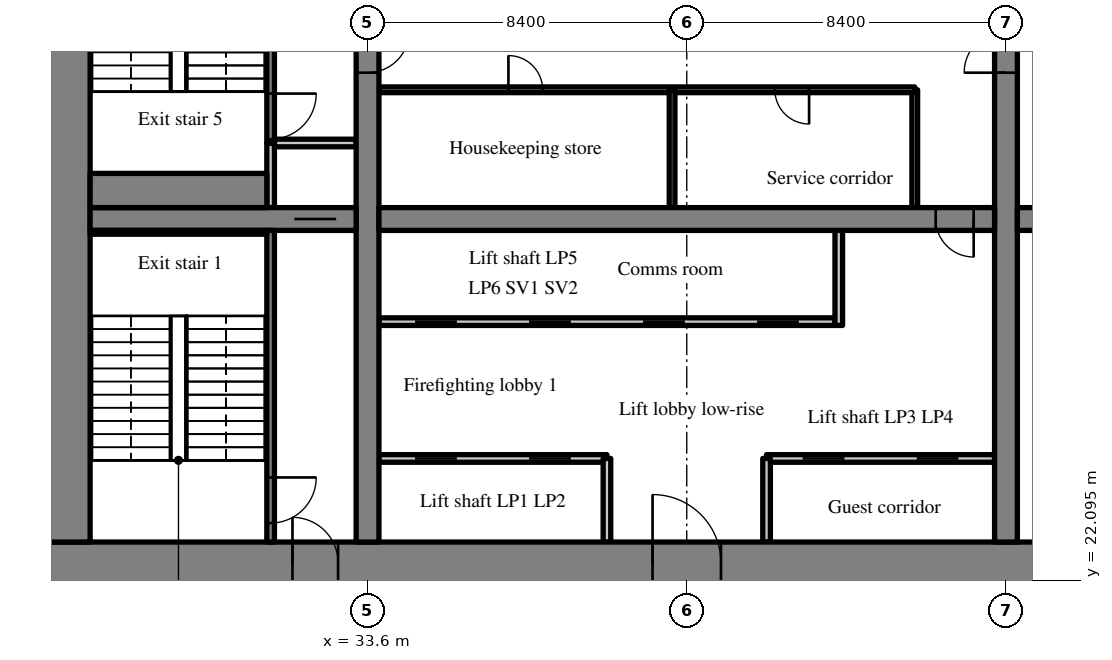
"""IFC4 building model, lengths in metres.
Left out: names, types, materials, properties, quantities, classifications, styles, units other than length and angle.
Written with IfcOpenShell. Run it as: python <this file> out.ifc"""

import sys

from ifc_helpers import new_model, si_unit, direction, frame, frame_2d, origin, place, context, subcontext, project, spatial, rectangle, extrude, source, transform, mapped, element, fill, save


model = new_model("IFC4")
c1 = context("Model", 3, precision=1e-05, world=origin(), true_north=direction((0.0, 1.0)))
c2 = subcontext(c1, "Body", "Model", "MODEL_VIEW")
j1 = project(units=[si_unit("LENGTHUNIT", "METRE"), si_unit("PLANEANGLEUNIT", "RADIAN")], contexts=[c1])
p1 = place(None, origin())
s1 = spatial("IfcSite", under=j1, at=p1, CompositionType="ELEMENT")
p2 = place(p1, origin())
s2 = spatial("IfcBuilding", under=s1, at=p2, CompositionType="ELEMENT")
p3 = place(p2, frame((0.0, 0.0, 27.8)))
s3 = spatial("IfcBuildingStorey", under=s2, at=p3, CompositionType="ELEMENT", Elevation=27.8)
m1 = source(origin(), c2, "Body", "SweptSolid", [
    extrude(rectangle(XDim=50.4, YDim=1.1, at=frame_2d((25.2, 0.0))), origin(), (0.0, 0.0, 1.0), 3.52),
])
p4 = place(p3, frame((25.2, 22.55, 0.0), z_axis=(0.0, 0.0, 1.0), x_axis=(1.0, 0.0, 0.0)))
e1 = element("IfcWall", 1, at=p4, inside=s3, PredefinedType="SHEAR", context=c2, shape_type="MappedRepresentation", body=[
    mapped(m1, transform((0.0, 0.0, 0.0), scale=1.0)),
])
m2 = source(origin(), c2, "Body", "SweptSolid", [
    extrude(rectangle(XDim=1.8, YDim=2.1, at=frame_2d((0.9, 1.05))), frame((0.0, 0.56, 0.0), z_axis=(0.0, -1.0, 0.0), x_axis=(1.0, 0.0, 0.0)), (0.0, 0.0, 1.0), 1.12),
])
p5 = place(p4, frame((15.9, 0.0, 0.0)))
e2 = element("IfcOpeningElement", 2, at=p5, cuts=e1, PredefinedType="OPENING", context=c2, shape_type="MappedRepresentation", body=[
    mapped(m2, transform((0.0, 0.0, 0.0), scale=1.0)),
])
m3 = source(origin(), c2, "Body", "SweptSolid", [
    extrude(rectangle(XDim=1.2, YDim=2.1, at=frame_2d((0.6, 1.05))), frame((0.0, 0.56, 0.0), z_axis=(0.0, -1.0, 0.0), x_axis=(1.0, 0.0, 0.0)), (0.0, 0.0, 1.0), 1.12),
])
p6 = place(p4, frame((27.0, 0.0, 0.0)))
e3 = element("IfcOpeningElement", 3, at=p6, cuts=e1, PredefinedType="OPENING", context=c2, shape_type="MappedRepresentation", body=[
    mapped(m3, transform((0.0, 0.0, 0.0), scale=1.0)),
])
m4 = source(origin(), c2, "Body", "SweptSolid", [
    extrude(rectangle(XDim=0.9, YDim=2.1, at=frame_2d((0.45, 1.05))), frame((0.0, 0.56, 0.0), z_axis=(0.0, -1.0, 0.0), x_axis=(1.0, 0.0, 0.0)), (0.0, 0.0, 1.0), 1.12),
])
p7 = place(p4, frame((32.25, 0.0, 0.0)))
e4 = element("IfcOpeningElement", 4, at=p7, cuts=e1, PredefinedType="OPENING", context=c2, shape_type="MappedRepresentation", body=[
    mapped(m4, transform((0.0, 0.0, 0.0), scale=1.0)),
])
p8 = place(p4, frame((38.25, 0.0, 0.0)))
e5 = element("IfcOpeningElement", 5, at=p8, cuts=e1, PredefinedType="OPENING", context=c2, shape_type="MappedRepresentation", body=[
    mapped(m4, transform((0.0, 0.0, 0.0), scale=1.0)),
])
p9 = place(p4, frame((6.425, 0.0, 0.0)))
e6 = element("IfcOpeningElement", 6, at=p9, cuts=e1, PredefinedType="OPENING", context=c2, shape_type="MappedRepresentation", body=[
    mapped(m3, transform((0.0, 0.0, 0.0), scale=1.0)),
])
p10 = place(p4, frame((47.675, 0.0, 0.0)))
e7 = element("IfcOpeningElement", 7, at=p10, cuts=e1, PredefinedType="OPENING", context=c2, shape_type="MappedRepresentation", body=[
    mapped(m3, transform((0.0, 0.0, 0.0), scale=1.0)),
])
m5 = source(origin(), c2, "Body", "SweptSolid", [
    extrude(rectangle(XDim=17.8, YDim=1.1, at=frame_2d((8.9, 0.0))), origin(), (0.0, 0.0, 1.0), 3.52),
])
p11 = place(p3, frame((25.75, 23.1, 0.0), z_axis=(0.0, 0.0, 1.0), x_axis=(0.0, 1.0, 0.0)))
e8 = element("IfcWall", 8, at=p11, inside=s3, PredefinedType="SHEAR", context=c2, shape_type="MappedRepresentation", body=[
    mapped(m5, transform((0.0, 0.0, 0.0), scale=1.0)),
])
m6 = source(origin(), c2, "Body", "SweptSolid", [
    extrude(rectangle(XDim=17.8, YDim=0.6, at=frame_2d((8.9, 0.0))), origin(), (0.0, 0.0, 1.0), 3.52),
])
p12 = place(p3, frame((33.6, 23.1, 0.0), z_axis=(0.0, 0.0, 1.0), x_axis=(0.0, 1.0, 0.0)))
e9 = element("IfcWall", 9, at=p12, inside=s3, PredefinedType="SHEAR", context=c2, shape_type="MappedRepresentation", body=[
    mapped(m6, transform((0.0, 0.0, 0.0), scale=1.0)),
])
m7 = source(origin(), c2, "Body", "SweptSolid", [
    extrude(rectangle(XDim=1.1, YDim=2.1, at=frame_2d((0.55, 1.05))), frame((0.0, 0.31, 0.0), z_axis=(0.0, -1.0, 0.0), x_axis=(1.0, 0.0, 0.0)), (0.0, 0.0, 1.0), 0.62),
])
p13 = place(p12, frame((12.35, 0.0, 0.0)))
e10 = element("IfcOpeningElement", 10, at=p13, cuts=e9, PredefinedType="OPENING", context=c2, shape_type="MappedRepresentation", body=[
    mapped(m7, transform((0.0, 0.0, 0.0), scale=1.0)),
])
p14 = place(p3, frame((50.4, 23.1, 0.0), z_axis=(0.0, 0.0, 1.0), x_axis=(0.0, 1.0, 0.0)))
e11 = element("IfcWall", 11, at=p14, inside=s3, PredefinedType="SHEAR", context=c2, shape_type="MappedRepresentation", body=[
    mapped(m6, transform((0.0, 0.0, 0.0), scale=1.0)),
])
p15 = place(p14, frame((12.35, 0.0, 0.0)))
e12 = element("IfcOpeningElement", 12, at=p15, cuts=e11, PredefinedType="OPENING", context=c2, shape_type="MappedRepresentation", body=[
    mapped(m7, transform((0.0, 0.0, 0.0), scale=1.0)),
])
m8 = source(origin(), c2, "Body", "SweptSolid", [
    extrude(rectangle(XDim=7.0, YDim=0.6, at=frame_2d((3.5, 0.0))), origin(), (0.0, 0.0, 1.0), 3.52),
])
p16 = place(p3, frame((26.3, 31.6, 0.0), z_axis=(0.0, 0.0, 1.0), x_axis=(1.0, 0.0, 0.0)))
e13 = element("IfcWall", 13, at=p16, inside=s3, PredefinedType="SHEAR", context=c2, shape_type="MappedRepresentation", body=[
    mapped(m8, transform((0.0, 0.0, 0.0), scale=1.0)),
])
p17 = place(p16, frame((5.375, 0.0, 0.0)))
e14 = element("IfcOpeningElement", 14, at=p17, cuts=e13, PredefinedType="OPENING", context=c2, shape_type="MappedRepresentation", body=[
    mapped(m7, transform((0.0, 0.0, 0.0), scale=1.0)),
])
m9 = source(origin(), c2, "Body", "SweptSolid", [
    extrude(rectangle(XDim=16.2, YDim=0.6, at=frame_2d((8.1, 0.0))), origin(), (0.0, 0.0, 1.0), 3.52),
])
p18 = place(p3, frame((33.9, 31.6, 0.0), z_axis=(0.0, 0.0, 1.0), x_axis=(1.0, 0.0, 0.0)))
e15 = element("IfcWall", 15, at=p18, inside=s3, PredefinedType="SHEAR", context=c2, shape_type="MappedRepresentation", body=[
    mapped(m9, transform((0.0, 0.0, 0.0), scale=1.0)),
])
m10 = source(origin(), c2, "Body", "SweptSolid", [
    extrude(rectangle(XDim=1.0, YDim=2.1, at=frame_2d((0.5, 1.05))), frame((0.0, 0.31, 0.0), z_axis=(0.0, -1.0, 0.0), x_axis=(1.0, 0.0, 0.0)), (0.0, 0.0, 1.0), 0.62),
])
p19 = place(p18, frame((14.65, 0.0, 0.0)))
e16 = element("IfcOpeningElement", 16, at=p19, cuts=e15, PredefinedType="OPENING", context=c2, shape_type="MappedRepresentation", body=[
    mapped(m10, transform((0.0, 0.0, 0.0), scale=1.0)),
])
m11 = source(origin(), c2, "Body", "SweptSolid", [
    extrude(rectangle(XDim=16.2, YDim=0.6, at=frame_2d((8.1, 0.0))), origin(), (0.0, 0.0, 1.0), 3.52),
])
p20 = place(p3, frame((50.7, 31.6, 0.0), z_axis=(0.0, 0.0, 1.0), x_axis=(1.0, 0.0, 0.0)))
e17 = element("IfcWall", 17, at=p20, inside=s3, PredefinedType="SHEAR", context=c2, shape_type="MappedRepresentation", body=[
    mapped(m11, transform((0.0, 0.0, 0.0), scale=1.0)),
])
p21 = place(p20, frame((0.55, 0.0, 0.0)))
e18 = element("IfcOpeningElement", 18, at=p21, cuts=e17, PredefinedType="OPENING", context=c2, shape_type="MappedRepresentation", body=[
    mapped(m10, transform((0.0, 0.0, 0.0), scale=1.0)),
])
m12 = source(origin(), c2, "Body", "SweptSolid", [
    extrude(rectangle(XDim=6.0, YDim=0.2, at=frame_2d((3.0, 0.0))), origin(), (0.0, 0.0, 1.0), 3.52),
])
p22 = place(p3, frame((33.9, 25.3, 0.0), z_axis=(0.0, 0.0, 1.0), x_axis=(1.0, 0.0, 0.0)))
e19 = element("IfcWall", 19, at=p22, inside=s3, PredefinedType="SOLIDWALL", context=c2, shape_type="MappedRepresentation", body=[
    mapped(m12, transform((0.0, 0.0, 0.0), scale=1.0)),
])
m13 = source(origin(), c2, "Body", "SweptSolid", [
    extrude(rectangle(XDim=1.1, YDim=2.1, at=frame_2d((0.55, 1.05))), frame((0.0, 0.11, 0.0), z_axis=(0.0, -1.0, 0.0), x_axis=(1.0, 0.0, 0.0)), (0.0, 0.0, 1.0), 0.22),
])
p23 = place(p22, frame((0.95, 0.0, 0.0)))
e20 = element("IfcOpeningElement", 20, at=p23, cuts=e19, PredefinedType="OPENING", context=c2, shape_type="MappedRepresentation", body=[
    mapped(m13, transform((0.0, 0.0, 0.0), scale=1.0)),
])
p24 = place(p22, frame((3.95, 0.0, 0.0)))
e21 = element("IfcOpeningElement", 21, at=p24, cuts=e19, PredefinedType="OPENING", context=c2, shape_type="MappedRepresentation", body=[
    mapped(m13, transform((0.0, 0.0, 0.0), scale=1.0)),
])
p25 = place(p3, frame((44.1, 25.3, 0.0), z_axis=(0.0, 0.0, 1.0), x_axis=(1.0, 0.0, 0.0)))
e22 = element("IfcWall", 22, at=p25, inside=s3, PredefinedType="SOLIDWALL", context=c2, shape_type="MappedRepresentation", body=[
    mapped(m12, transform((0.0, 0.0, 0.0), scale=1.0)),
])
p26 = place(p25, frame((0.95, 0.0, 0.0)))
e23 = element("IfcOpeningElement", 23, at=p26, cuts=e22, PredefinedType="OPENING", context=c2, shape_type="MappedRepresentation", body=[
    mapped(m13, transform((0.0, 0.0, 0.0), scale=1.0)),
])
p27 = place(p25, frame((3.95, 0.0, 0.0)))
e24 = element("IfcOpeningElement", 24, at=p27, cuts=e22, PredefinedType="OPENING", context=c2, shape_type="MappedRepresentation", body=[
    mapped(m13, transform((0.0, 0.0, 0.0), scale=1.0)),
])
m14 = source(origin(), c2, "Body", "SweptSolid", [
    extrude(rectangle(XDim=12.0, YDim=0.2, at=frame_2d((6.0, 0.0))), origin(), (0.0, 0.0, 1.0), 3.52),
])
p28 = place(p3, frame((33.9, 28.9, 0.0), z_axis=(0.0, 0.0, 1.0), x_axis=(1.0, 0.0, 0.0)))
e25 = element("IfcWall", 25, at=p28, inside=s3, PredefinedType="SOLIDWALL", context=c2, shape_type="MappedRepresentation", body=[
    mapped(m14, transform((0.0, 0.0, 0.0), scale=1.0)),
])
p29 = place(p28, frame((0.95, 0.0, 0.0)))
e26 = element("IfcOpeningElement", 26, at=p29, cuts=e25, PredefinedType="OPENING", context=c2, shape_type="MappedRepresentation", body=[
    mapped(m13, transform((0.0, 0.0, 0.0), scale=1.0)),
])
p30 = place(p28, frame((3.95, 0.0, 0.0)))
e27 = element("IfcOpeningElement", 27, at=p30, cuts=e25, PredefinedType="OPENING", context=c2, shape_type="MappedRepresentation", body=[
    mapped(m13, transform((0.0, 0.0, 0.0), scale=1.0)),
])
p31 = place(p28, frame((6.95, 0.0, 0.0)))
e28 = element("IfcOpeningElement", 28, at=p31, cuts=e25, PredefinedType="OPENING", context=c2, shape_type="MappedRepresentation", body=[
    mapped(m13, transform((0.0, 0.0, 0.0), scale=1.0)),
])
p32 = place(p28, frame((9.95, 0.0, 0.0)))
e29 = element("IfcOpeningElement", 29, at=p32, cuts=e25, PredefinedType="OPENING", context=c2, shape_type="MappedRepresentation", body=[
    mapped(m13, transform((0.0, 0.0, 0.0), scale=1.0)),
])
m15 = source(origin(), c2, "Body", "SweptSolid", [
    extrude(rectangle(XDim=2.2, YDim=0.2, at=frame_2d((1.1, 0.0))), origin(), (0.0, 0.0, 1.0), 3.52),
])
for number, where, z_axis, x_axis in (
    (30, (39.9, 23.1, 0.0), (0.0, 0.0, 1.0), (0.0, 1.0, 0.0)),
    (31, (44.1, 23.1, 0.0), (0.0, 0.0, 1.0), (0.0, 1.0, 0.0)),
):
    element("IfcWall", number, at=place(p3, frame(where, z_axis=z_axis, x_axis=x_axis)), inside=s3, PredefinedType="SOLIDWALL", context=c2, shape_type="MappedRepresentation", body=[
        mapped(m15, transform((0.0, 0.0, 0.0), scale=1.0)),
    ])
m16 = source(origin(), c2, "Body", "SweptSolid", [
    extrude(rectangle(XDim=2.5, YDim=0.2, at=frame_2d((1.25, 0.0))), origin(), (0.0, 0.0, 1.0), 3.52),
])
p33 = place(p3, frame((46.0, 28.8, 0.0), z_axis=(0.0, 0.0, 1.0), x_axis=(0.0, 1.0, 0.0)))
e32 = element("IfcWall", 32, at=p33, inside=s3, PredefinedType="SOLIDWALL", context=c2, shape_type="MappedRepresentation", body=[
    mapped(m16, transform((0.0, 0.0, 0.0), scale=1.0)),
])
m17 = source(origin(), c2, "Body", "SweptSolid", [
    extrude(rectangle(XDim=3.1, YDim=0.15, at=frame_2d((1.55, 0.0))), origin(), (0.0, 0.0, 1.0), 3.52),
])
p34 = place(p3, frame((48.0, 31.9, 0.0), z_axis=(0.0, 0.0, 1.0), x_axis=(0.0, 1.0, 0.0)))
e33 = element("IfcWall", 33, at=p34, inside=s3, PredefinedType="PARTITIONING", context=c2, shape_type="MappedRepresentation", body=[
    mapped(m17, transform((0.0, 0.0, 0.0), scale=1.0)),
])
m18 = source(origin(), c2, "Body", "SweptSolid", [
    extrude(rectangle(XDim=14.1, YDim=0.15, at=frame_2d((7.05, 0.0))), origin(), (0.0, 0.0, 1.0), 3.52),
])
p35 = place(p3, frame((33.9, 35.0, 0.0), z_axis=(0.0, 0.0, 1.0), x_axis=(1.0, 0.0, 0.0)))
e34 = element("IfcWall", 34, at=p35, inside=s3, PredefinedType="PARTITIONING", context=c2, shape_type="MappedRepresentation", body=[
    mapped(m18, transform((0.0, 0.0, 0.0), scale=1.0)),
])
m19 = source(origin(), c2, "Body", "SweptSolid", [
    extrude(rectangle(XDim=0.9, YDim=2.1, at=frame_2d((0.45, 1.05))), frame((0.0, 0.085, 0.0), z_axis=(0.0, -1.0, 0.0), x_axis=(1.0, 0.0, 0.0)), (0.0, 0.0, 1.0), 0.17),
])
p36 = place(p35, frame((3.407, 0.0, 0.0)))
e35 = element("IfcOpeningElement", 35, at=p36, cuts=e34, PredefinedType="OPENING", context=c2, shape_type="MappedRepresentation", body=[
    mapped(m19, transform((0.0, 0.0, 0.0), scale=1.0)),
])
p37 = place(p35, frame((10.419, 0.0, 0.0)))
e36 = element("IfcOpeningElement", 36, at=p37, cuts=e34, PredefinedType="OPENING", context=c2, shape_type="MappedRepresentation", body=[
    mapped(m19, transform((0.0, 0.0, 0.0), scale=1.0)),
])
p38 = place(p3, frame((41.614, 31.9, 0.0), z_axis=(0.0, 0.0, 1.0), x_axis=(0.0, 1.0, 0.0)))
e37 = element("IfcWall", 37, at=p38, inside=s3, PredefinedType="PARTITIONING", context=c2, shape_type="MappedRepresentation", body=[
    mapped(m17, transform((0.0, 0.0, 0.0), scale=1.0)),
])
m20 = source(origin(), c2, "Body", "SweptSolid", [
    extrude(rectangle(XDim=8.2, YDim=0.2, at=frame_2d((4.1, 0.0))), origin(), (0.0, 0.0, 1.0), 3.52),
])
p39 = place(p3, frame((31.05, 23.1, 0.0), z_axis=(0.0, 0.0, 1.0), x_axis=(0.0, 1.0, 0.0)))
e38 = element("IfcWall", 38, at=p39, inside=s3, PredefinedType="SOLIDWALL", context=c2, shape_type="MappedRepresentation", body=[
    mapped(m20, transform((0.0, 0.0, 0.0), scale=1.0)),
])
m21 = source(origin(), c2, "Body", "SweptSolid", [
    extrude(rectangle(XDim=1.2, YDim=2.1, at=frame_2d((0.6, 1.05))), frame((0.0, 0.11, 0.0), z_axis=(0.0, -1.0, 0.0), x_axis=(1.0, 0.0, 0.0)), (0.0, 0.0, 1.0), 0.22),
])
p40 = place(p39, frame((0.5, 0.0, 0.0)))
e39 = element("IfcOpeningElement", 39, at=p40, cuts=e38, PredefinedType="OPENING", context=c2, shape_type="MappedRepresentation", body=[
    mapped(m21, transform((0.0, 0.0, 0.0), scale=1.0)),
])
m22 = source(origin(), c2, "Body", "SweptSolid", [
    extrude(rectangle(XDim=1.7, YDim=0.2, at=frame_2d((0.85, 0.0))), origin(), (0.0, 0.0, 1.0), 3.52),
])
p41 = place(p3, frame((31.05, 31.9, 0.0), z_axis=(0.0, 0.0, 1.0), x_axis=(0.0, 1.0, 0.0)))
e40 = element("IfcWall", 40, at=p41, inside=s3, PredefinedType="SOLIDWALL", context=c2, shape_type="MappedRepresentation", body=[
    mapped(m22, transform((0.0, 0.0, 0.0), scale=1.0)),
])
m23 = source(origin(), c2, "Body", "SweptSolid", [
    extrude(rectangle(XDim=2.15, YDim=0.2, at=frame_2d((1.075, 0.0))), origin(), (0.0, 0.0, 1.0), 3.52),
])
p42 = place(p3, frame((31.15, 33.6, 0.0), z_axis=(0.0, 0.0, 1.0), x_axis=(1.0, 0.0, 0.0)))
e41 = element("IfcWall", 41, at=p42, inside=s3, PredefinedType="SOLIDWALL", context=c2, shape_type="MappedRepresentation", body=[
    mapped(m23, transform((0.0, 0.0, 0.0), scale=1.0)),
])
m24 = source(origin(), c2, "Body", "SweptSolid", [
    extrude(rectangle(XDim=7.3, YDim=0.2, at=frame_2d((3.65, 0.0))), origin(), (0.0, 0.0, 1.0), 3.52),
])
p43 = place(p3, frame((31.05, 33.6, 0.0), z_axis=(0.0, 0.0, 1.0), x_axis=(0.0, 1.0, 0.0)))
e42 = element("IfcWall", 42, at=p43, inside=s3, PredefinedType="SOLIDWALL", context=c2, shape_type="MappedRepresentation", body=[
    mapped(m24, transform((0.0, 0.0, 0.0), scale=1.0)),
])
p44 = place(p43, frame((0.1, 0.0, 0.0)))
e43 = element("IfcOpeningElement", 43, at=p44, cuts=e42, PredefinedType="OPENING", context=c2, shape_type="MappedRepresentation", body=[
    mapped(m21, transform((0.0, 0.0, 0.0), scale=1.0)),
])
m25 = source(origin(), c2, "Body", "SweptSolid", [
    extrude(rectangle(XDim=4.65, YDim=0.1, at=frame_2d((2.325, 0.0))), origin(), (0.0, 0.0, 1.0), 3.52),
])
p45 = place(p3, frame((26.3, 31.25, 0.0), z_axis=(0.0, 0.0, 1.0), x_axis=(1.0, 0.0, 0.0)))
e44 = element("IfcWall", 44, at=p45, inside=s3, PredefinedType="SOLIDWALL", context=c2, shape_type="MappedRepresentation", body=[
    mapped(m25, transform((0.0, 0.0, 0.0), scale=1.0)),
])
m26 = source(origin(), c2, "Body", "SweptSolid", [
    extrude(rectangle(XDim=4.65, YDim=0.9, at=frame_2d((2.325, 0.0))), origin(), (0.0, 0.0, 1.0), 3.52),
])
p46 = place(p3, frame((26.3, 32.35, 0.0), z_axis=(0.0, 0.0, 1.0), x_axis=(1.0, 0.0, 0.0)))
e45 = element("IfcWall", 45, at=p46, inside=s3, PredefinedType="SOLIDWALL", context=c2, shape_type="MappedRepresentation", body=[
    mapped(m26, transform((0.0, 0.0, 0.0), scale=1.0)),
])
m27 = source(origin(), c2, "Body", "SweptSolid", [
    extrude(rectangle(XDim=1.8, YDim=2.1, at=frame_2d((0.9, 1.05))), frame((0.0, 0.325, 0.0), z_axis=(0.0, -1.0, 0.0), x_axis=(1.0, 0.0, 0.0)), (0.0, 0.0, 1.0), 0.05),
])
p47 = place(p5, origin())
e46 = element("IfcDoor", 46, at=p47, inside=s3, OperationType="DOUBLE_DOOR_SINGLE_SWING", PredefinedType="DOOR", context=c2, shape_type="MappedRepresentation", body=[
    mapped(m27, transform((0.0, 0.0, 0.0), scale=1.0)),
])
fill(e2, e46)
m28 = source(origin(), c2, "Body", "SweptSolid", [
    extrude(rectangle(XDim=1.0, YDim=2.1, at=frame_2d((0.5, 1.05))), frame((0.0, 0.025, 0.0), z_axis=(0.0, -1.0, 0.0), x_axis=(1.0, 0.0, 0.0)), (0.0, 0.0, 1.0), 0.05),
])
p48 = place(p19, origin())
e47 = element("IfcDoor", 47, at=p48, inside=s3, OperationType="SINGLE_SWING_RIGHT", PredefinedType="DOOR", context=c2, shape_type="MappedRepresentation", body=[
    mapped(m28, transform((0.0, 0.0, 0.0), scale=1.0)),
])
fill(e16, e47)
m29 = source(origin(), c2, "Body", "SweptSolid", [
    extrude(rectangle(XDim=1.1, YDim=2.1, at=frame_2d((0.55, 1.05))), frame((0.0, 0.025, 0.0), z_axis=(0.0, -1.0, 0.0), x_axis=(1.0, 0.0, 0.0)), (0.0, 0.0, 1.0), 0.05),
])
p49 = place(p23, origin())
e48 = element("IfcDoor", 48, at=p49, inside=s3, OperationType="SLIDING_TO_LEFT", PredefinedType="DOOR", context=c2, shape_type="MappedRepresentation", body=[
    mapped(m29, transform((0.0, 0.0, 0.0), scale=1.0)),
])
fill(e20, e48)
p50 = place(p24, origin())
e49 = element("IfcDoor", 49, at=p50, inside=s3, OperationType="SLIDING_TO_RIGHT", PredefinedType="DOOR", context=c2, shape_type="MappedRepresentation", body=[
    mapped(m29, transform((0.0, 0.0, 0.0), scale=1.0)),
])
fill(e21, e49)
p51 = place(p26, origin())
e50 = element("IfcDoor", 50, at=p51, inside=s3, OperationType="SLIDING_TO_LEFT", PredefinedType="DOOR", context=c2, shape_type="MappedRepresentation", body=[
    mapped(m29, transform((0.0, 0.0, 0.0), scale=1.0)),
])
fill(e23, e50)
p52 = place(p27, origin())
e51 = element("IfcDoor", 51, at=p52, inside=s3, OperationType="SLIDING_TO_RIGHT", PredefinedType="DOOR", context=c2, shape_type="MappedRepresentation", body=[
    mapped(m29, transform((0.0, 0.0, 0.0), scale=1.0)),
])
fill(e24, e51)
p53 = place(p29, origin())
e52 = element("IfcDoor", 52, at=p53, inside=s3, OperationType="SLIDING_TO_LEFT", PredefinedType="DOOR", context=c2, shape_type="MappedRepresentation", body=[
    mapped(m29, transform((0.0, 0.0, 0.0), scale=1.0)),
])
fill(e26, e52)
p54 = place(p30, origin())
e53 = element("IfcDoor", 53, at=p54, inside=s3, OperationType="SLIDING_TO_RIGHT", PredefinedType="DOOR", context=c2, shape_type="MappedRepresentation", body=[
    mapped(m29, transform((0.0, 0.0, 0.0), scale=1.0)),
])
fill(e27, e53)
p55 = place(p31, origin())
e54 = element("IfcDoor", 54, at=p55, inside=s3, OperationType="SLIDING_TO_LEFT", PredefinedType="DOOR", context=c2, shape_type="MappedRepresentation", body=[
    mapped(m29, transform((0.0, 0.0, 0.0), scale=1.0)),
])
fill(e28, e54)
p56 = place(p32, origin())
e55 = element("IfcDoor", 55, at=p56, inside=s3, OperationType="SLIDING_TO_RIGHT", PredefinedType="DOOR", context=c2, shape_type="MappedRepresentation", body=[
    mapped(m29, transform((0.0, 0.0, 0.0), scale=1.0)),
])
fill(e29, e55)
m30 = source(origin(), c2, "Body", "SweptSolid", [
    extrude(rectangle(XDim=0.9, YDim=2.1, at=frame_2d((0.45, 1.05))), frame((0.0, 0.025, 0.0), z_axis=(0.0, -1.0, 0.0), x_axis=(1.0, 0.0, 0.0)), (0.0, 0.0, 1.0), 0.05),
])
p57 = place(p36, origin())
e56 = element("IfcDoor", 56, at=p57, inside=s3, OperationType="SINGLE_SWING_LEFT", PredefinedType="DOOR", context=c2, shape_type="MappedRepresentation", body=[
    mapped(m30, transform((0.0, 0.0, 0.0), scale=1.0)),
])
fill(e35, e56)
p58 = place(p37, origin())
e57 = element("IfcDoor", 57, at=p58, inside=s3, OperationType="SINGLE_SWING_RIGHT", PredefinedType="DOOR", context=c2, shape_type="MappedRepresentation", body=[
    mapped(m30, transform((0.0, 0.0, 0.0), scale=1.0)),
])
fill(e36, e57)
m31 = source(origin(), c2, "Body", "SweptSolid", [
    extrude(rectangle(XDim=1.2, YDim=2.1, at=frame_2d((0.6, 1.05))), frame((0.0, 0.025, 0.0), z_axis=(0.0, -1.0, 0.0), x_axis=(1.0, 0.0, 0.0)), (0.0, 0.0, 1.0), 0.05),
])
p59 = place(p40, origin())
e58 = element("IfcDoor", 58, at=p59, inside=s3, OperationType="SINGLE_SWING_RIGHT", PredefinedType="DOOR", context=c2, shape_type="MappedRepresentation", body=[
    mapped(m31, transform((0.0, 0.0, 0.0), scale=1.0)),
])
fill(e39, e58)
m32 = source(origin(), c2, "Body", "SweptSolid", [
    extrude(rectangle(XDim=1.2, YDim=2.1, at=frame_2d((0.6, 1.05))), frame((0.0, 0.325, 0.0), z_axis=(0.0, -1.0, 0.0), x_axis=(1.0, 0.0, 0.0)), (0.0, 0.0, 1.0), 0.05),
])
p60 = place(p9, origin())
e59 = element("IfcDoor", 59, at=p60, inside=s3, OperationType="SINGLE_SWING_LEFT", PredefinedType="DOOR", context=c2, shape_type="MappedRepresentation", body=[
    mapped(m32, transform((0.0, 0.0, 0.0), scale=1.0)),
])
fill(e6, e59)
p61 = place(p17, origin())
e60 = element("IfcDoor", 60, at=p61, inside=s3, OperationType="SLIDING_TO_RIGHT", PredefinedType="DOOR", context=c2, shape_type="MappedRepresentation", body=[
    mapped(m29, transform((0.0, 0.0, 0.0), scale=1.0)),
])
fill(e14, e60)
p62 = place(p44, origin())
e61 = element("IfcDoor", 61, at=p62, inside=s3, OperationType="SINGLE_SWING_RIGHT", PredefinedType="DOOR", context=c2, shape_type="MappedRepresentation", body=[
    mapped(m31, transform((0.0, 0.0, 0.0), scale=1.0)),
])
fill(e43, e61)
p63 = place(p13, origin())
e62 = element("IfcDoor", 62, at=p63, inside=s3, OperationType="SINGLE_SWING_RIGHT", PredefinedType="DOOR", context=c2, shape_type="MappedRepresentation", body=[
    mapped(m29, transform((0.0, 0.0, 0.0), scale=1.0)),
])
fill(e10, e62)
p64 = place(p15, origin())
e63 = element("IfcDoor", 63, at=p64, inside=s3, OperationType="SINGLE_SWING_LEFT", PredefinedType="DOOR", context=c2, shape_type="MappedRepresentation", body=[
    mapped(m29, transform((0.0, 0.0, 0.0), scale=1.0)),
])
fill(e12, e63)
save(model, sys.argv[1])
